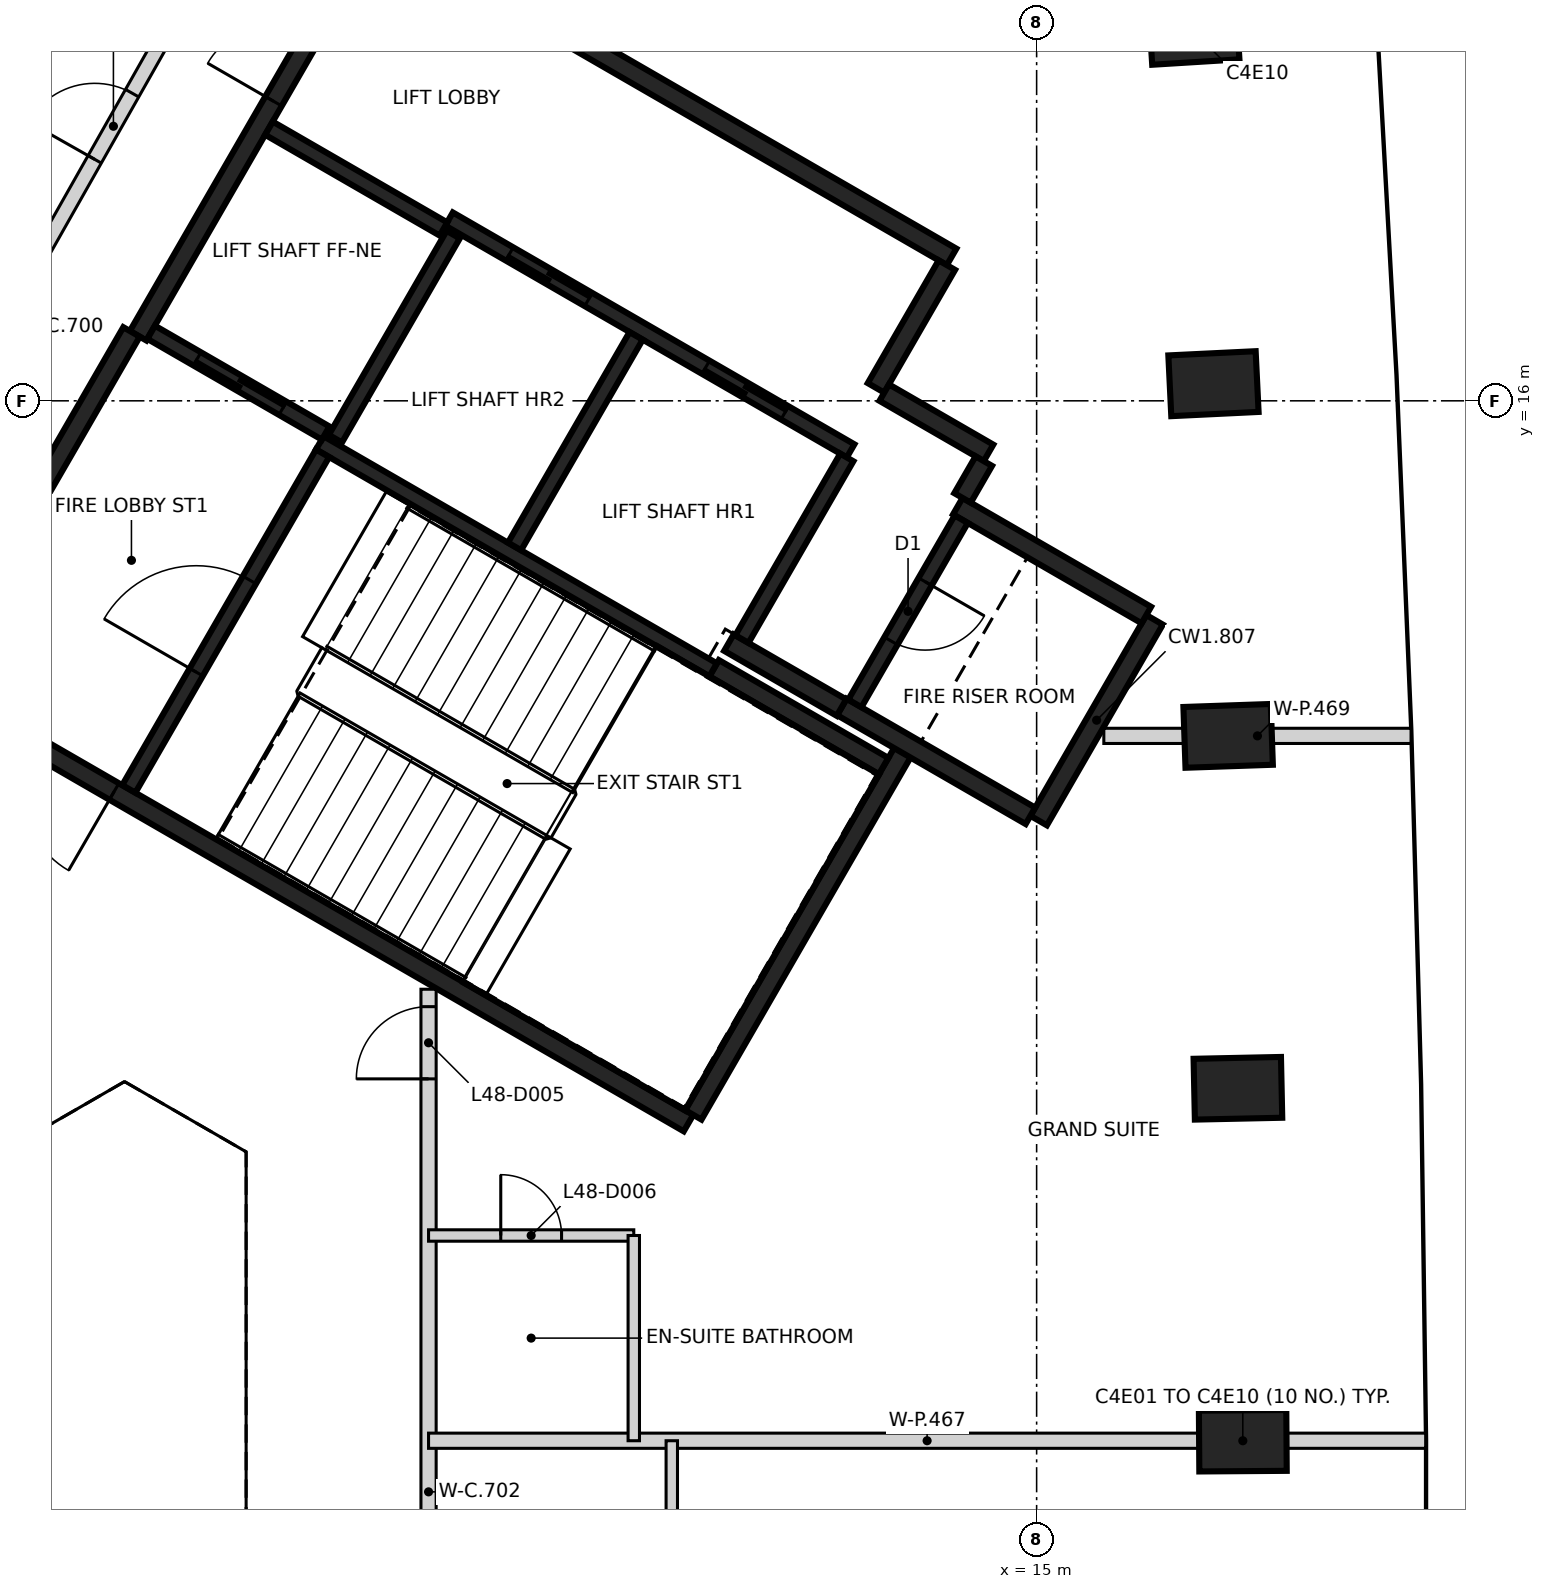
"""IFC4 building model, lengths in metres.
Left out: names, types, materials, properties, quantities, classifications, styles, units other than length and angle.
Written with IfcOpenShell. Run it as: python <this file> out.ifc"""

import sys

from ifc_helpers import new_model, si_unit, direction, frame, frame_2d, origin, origin_2d, place, context, subcontext, project, spatial, rectangle, extrude, element, fill, save


model = new_model("IFC4")
c1 = context("Model", 3, precision=1e-05, world=origin(), true_north=direction((0.0, 1.0)))
c2 = subcontext(c1, "Body", "Model", "MODEL_VIEW")
j1 = project(units=[si_unit("LENGTHUNIT", "METRE"), si_unit("PLANEANGLEUNIT", "RADIAN")], contexts=[c1])
p1 = place(None, origin())
s1 = spatial("IfcSite", under=j1, at=p1, CompositionType="ELEMENT")
p2 = place(p1, origin())
s2 = spatial("IfcBuilding", under=s1, at=p2, CompositionType="ELEMENT")
p3 = place(p2, frame((0.0, 0.0, 193.6)))
s3 = spatial("IfcBuildingStorey", under=s2, at=p3, CompositionType="ELEMENT", Elevation=193.6)
for number, where, z_axis, x_axis in (
    (1, (17.712, 2.319, -0.35), (0.0, 0.0, 1.0), (1.0, 0.007, 0.0)),
    (2, (17.648, 6.956, -0.35), (0.0, 0.0, 1.0), (1.0, 0.021, 0.0)),
    (3, (17.519, 11.592, -0.35), (0.0, 0.0, 1.0), (0.999, 0.034, 0.0)),
    (4, (17.326, 16.226, -0.35), (0.0, 0.0, 1.0), (0.999, 0.048, 0.0)),
    (5, (17.07, 20.856, -0.35), (0.0, 0.0, 1.0), (0.998, 0.062, 0.0)),
):
    element("IfcColumn", number, at=place(p3, frame(where, z_axis=z_axis, x_axis=x_axis)), inside=s3, PredefinedType="COLUMN", context=c2, shape_type="SweptSolid", body=[
        extrude(rectangle(XDim=1.15, YDim=0.8, at=origin_2d()), origin(), (0.0, 0.0, 1.0), 3.6),
    ])
p4 = place(p3, frame((10.42, 6.498, 0.0), z_axis=(0.0, 0.0, 1.0), x_axis=(-0.866021906294, 0.500006057782, 0.0)))
e6 = element("IfcWall", 6, at=p4, inside=s3, PredefinedType="SHEAR", context=c2, shape_type="SweptSolid", body=[
    extrude(rectangle(XDim=11.55, YDim=0.25, at=frame_2d((5.775, 0.0))), origin(), (0.0, 0.0, 1.0), 3.25),
])
p5 = place(p4, frame((10.025, 0.0, 0.0)))
e7 = element("IfcOpeningElement", 7, at=p5, cuts=e6, PredefinedType="OPENING", context=c2, shape_type="SweptSolid", body=[
    extrude(rectangle(XDim=1.2, YDim=2.1, at=frame_2d((0.6, 1.05))), frame((0.0, 0.135, 0.0), z_axis=(0.0, -1.0, 0.0), x_axis=(1.0, 0.0, 0.0)), (0.0, 0.0, 1.0), 0.27),
])
p6 = place(p4, frame((8.725, 0.0, 0.0)))
e8 = element("IfcOpeningElement", 8, at=p6, cuts=e6, PredefinedType="OPENING", context=c2, shape_type="SweptSolid", body=[
    extrude(rectangle(XDim=1.2, YDim=2.1, at=frame_2d((0.6, 1.05))), frame((0.0, 0.135, 0.0), z_axis=(0.0, -1.0, 0.0), x_axis=(1.0, 0.0, 0.0)), (0.0, 0.0, 1.0), 0.27),
])
p7 = place(p3, frame((6.304, 22.269, 0.0), z_axis=(0.0, 0.0, 1.0), x_axis=(0.866022959057, -0.500004234368, 0.0)))
e9 = element("IfcWall", 9, at=p7, inside=s3, PredefinedType="SHEAR", context=c2, shape_type="SweptSolid", body=[
    extrude(rectangle(XDim=8.75, YDim=0.25, at=frame_2d((4.375, 0.0))), origin(), (0.0, 0.0, 1.0), 3.25),
])
p8 = place(p3, frame((3.179, 16.856, 0.0), z_axis=(0.0, 0.0, 1.0), x_axis=(0.500001955336, 0.866024274868, 0.0)))
e10 = element("IfcWall", 10, at=p8, inside=s3, PredefinedType="SHEAR", context=c2, shape_type="SweptSolid", body=[
    extrude(rectangle(XDim=6.125, YDim=0.25, at=frame_2d((3.062, 0.0))), origin(), (0.0, 0.0, 1.0), 3.25),
])
p9 = place(p8, frame((3.563, 0.0, 0.0)))
e11 = element("IfcOpeningElement", 11, at=p9, cuts=e10, PredefinedType="OPENING", context=c2, shape_type="SweptSolid", body=[
    extrude(rectangle(XDim=1.0, YDim=2.1, at=frame_2d((0.5, 1.05))), frame((0.0, 0.135, 0.0), z_axis=(0.0, -1.0, 0.0), x_axis=(1.0, 0.0, 0.0)), (0.0, 0.0, 1.0), 0.27),
])
p10 = place(p3, frame((0.48, 12.381, 0.0), z_axis=(0.0, 0.0, 1.0), x_axis=(0.49999885962, 0.866026062182, 0.0)))
e12 = element("IfcWall", 12, at=p10, inside=s3, PredefinedType="SHEAR", context=c2, shape_type="SweptSolid", body=[
    extrude(rectangle(XDim=5.225, YDim=0.25, at=frame_2d((2.612, 0.0))), origin(), (0.0, 0.0, 1.0), 3.25),
])
p11 = place(p3, frame((13.238, 11.378, 0.0), z_axis=(0.0, 0.0, 1.0), x_axis=(-0.500008851346, -0.866020293397, 0.0)))
e13 = element("IfcWall", 13, at=p11, inside=s3, PredefinedType="SHEAR", context=c2, shape_type="SweptSolid", body=[
    extrude(rectangle(XDim=5.51, YDim=0.25, at=frame_2d((2.755, 0.0))), origin(), (0.0, 0.0, 1.0), 3.25),
])
p12 = place(p3, frame((16.552, 13.119, 0.0), z_axis=(0.0, 0.0, 1.0), x_axis=(-0.499978833458, -0.866037623948, 0.0)))
e14 = element("IfcWall", 14, at=p12, inside=s3, PredefinedType="SHEAR", context=c2, shape_type="SweptSolid", body=[
    extrude(rectangle(XDim=3.05, YDim=0.25, at=frame_2d((1.525, 0.0))), origin(), (0.0, 0.0, 1.0), 3.25),
])
p13 = place(p3, frame((14.918, 10.54, 0.0), z_axis=(0.0, 0.0, 1.0), x_axis=(-0.866063538972, 0.499933942099, 0.0)))
e15 = element("IfcWall", 15, at=p13, inside=s3, PredefinedType="SHEAR", context=c2, shape_type="SweptSolid", body=[
    extrude(rectangle(XDim=2.865, YDim=0.25, at=frame_2d((1.432, 0.0))), origin(), (0.0, 0.0, 1.0), 3.25),
])
p14 = place(p3, frame((13.963, 14.614, 0.0), z_axis=(0.0, 0.0, 1.0), x_axis=(0.866042235819, -0.499970844928, 0.0)))
e16 = element("IfcWall", 16, at=p14, inside=s3, PredefinedType="SHEAR", context=c2, shape_type="SweptSolid", body=[
    extrude(rectangle(XDim=2.865, YDim=0.25, at=frame_2d((1.432, 0.0))), origin(), (0.0, 0.0, 1.0), 3.25),
])
p15 = place(p3, frame((10.757, 12.481, 0.0), z_axis=(0.0, 0.0, 1.0), x_axis=(0.866022940537, -0.500004266446, 0.0)))
e17 = element("IfcWall", 17, at=p15, inside=s3, PredefinedType="SHEAR", context=c2, shape_type="SweptSolid", body=[
    extrude(rectangle(XDim=2.575, YDim=0.25, at=frame_2d((1.287, 0.0))), origin(), (0.0, 0.0, 1.0), 3.25),
])
p16 = place(p3, frame((13.819, 17.785, 0.0), z_axis=(0.0, 0.0, 1.0), x_axis=(-0.500039802285, -0.866002422705, 0.0)))
e18 = element("IfcWall", 18, at=p16, inside=s3, PredefinedType="SHEAR", context=c2, shape_type="SweptSolid", body=[
    extrude(rectangle(XDim=1.865, YDim=0.25, at=frame_2d((0.932, 0.0))), origin(), (0.0, 0.0, 1.0), 3.25),
])
p17 = place(p3, frame((12.433, 11.964, 0.0), z_axis=(0.0, 0.0, 1.0), x_axis=(-0.866038183914, 0.499977863513, 0.0)))
e19 = element("IfcWall", 19, at=p17, inside=s3, PredefinedType="SHEAR", context=c2, shape_type="SweptSolid", body=[
    extrude(rectangle(XDim=1.71, YDim=0.25, at=frame_2d((0.855, 0.0))), origin(), (0.0, 0.0, 1.0), 3.25),
])
p18 = place(p3, frame((12.995, 16.108, 0.0), z_axis=(0.0, 0.0, 1.0), x_axis=(0.866044474677, -0.49996696679, 0.0)))
e20 = element("IfcWall", 20, at=p18, inside=s3, PredefinedType="SHEAR", context=c2, shape_type="SweptSolid", body=[
    extrude(rectangle(XDim=1.584, YDim=0.25, at=frame_2d((0.792, 0.0))), origin(), (0.0, 0.0, 1.0), 3.25),
])
p19 = place(p3, frame((14.305, 15.207, 0.0), z_axis=(0.0, 0.0, 1.0), x_axis=(-0.499848422343, -0.866112899501, 0.0)))
e21 = element("IfcWall", 21, at=p19, inside=s3, PredefinedType="SHEAR", context=c2, shape_type="SweptSolid", body=[
    extrude(rectangle(XDim=0.559, YDim=0.25, at=frame_2d((0.28, 0.0))), origin(), (0.0, 0.0, 1.0), 3.25),
])
p20 = place(p3, frame((12.552, 15.342, 0.0), z_axis=(0.0, 0.0, 1.0), x_axis=(-0.866030299012, 0.499991521122, 0.0)))
e22 = element("IfcWall", 22, at=p20, inside=s3, PredefinedType="SHEAR", context=c2, shape_type="SweptSolid", body=[
    extrude(rectangle(XDim=6.1, YDim=0.2, at=frame_2d((3.05, 0.0))), origin(), (0.0, 0.0, 1.0), 3.25),
])
p21 = place(p20, frame((1.0, 0.0, 0.0)))
e23 = element("IfcOpeningElement", 23, at=p21, cuts=e22, PredefinedType="OPENING", context=c2, shape_type="SweptSolid", body=[
    extrude(rectangle(XDim=1.2, YDim=2.1, at=frame_2d((0.6, 1.05))), frame((0.0, 0.11, 0.0), z_axis=(0.0, -1.0, 0.0), x_axis=(1.0, 0.0, 0.0)), (0.0, 0.0, 1.0), 0.22),
])
p22 = place(p20, frame((3.982, 0.0, 0.0)))
e24 = element("IfcOpeningElement", 24, at=p22, cuts=e22, PredefinedType="OPENING", context=c2, shape_type="SweptSolid", body=[
    extrude(rectangle(XDim=1.2, YDim=2.1, at=frame_2d((0.6, 1.05))), frame((0.0, 0.11, 0.0), z_axis=(0.0, -1.0, 0.0), x_axis=(1.0, 0.0, 0.0)), (0.0, 0.0, 1.0), 0.22),
])
p23 = place(p3, frame((10.743, 12.46, 0.0), z_axis=(0.0, 0.0, 1.0), x_axis=(-0.866018848283, 0.500011354289, 0.0)))
e25 = element("IfcWall", 25, at=p23, inside=s3, PredefinedType="SHEAR", context=c2, shape_type="SweptSolid", body=[
    extrude(rectangle(XDim=5.974, YDim=0.2, at=frame_2d((2.987, 0.0))), origin(), (0.0, 0.0, 1.0), 3.25),
])
p24 = place(p3, frame((3.057, 10.895, 0.0), z_axis=(0.0, 0.0, 1.0), x_axis=(0.500027839223, 0.866009330205, 0.0)))
e26 = element("IfcWall", 26, at=p24, inside=s3, PredefinedType="SHEAR", context=c2, shape_type="SweptSolid", body=[
    extrude(rectangle(XDim=5.098, YDim=0.2, at=frame_2d((2.549, 0.0))), origin(), (0.0, 0.0, 1.0), 3.25),
])
p25 = place(p24, frame((1.774, 0.0, 0.0)))
e27 = element("IfcOpeningElement", 27, at=p25, cuts=e26, PredefinedType="OPENING", context=c2, shape_type="SweptSolid", body=[
    extrude(rectangle(XDim=1.4, YDim=2.1, at=frame_2d((0.7, 1.05))), frame((0.0, 0.11, 0.0), z_axis=(0.0, -1.0, 0.0), x_axis=(1.0, 0.0, 0.0)), (0.0, 0.0, 1.0), 0.22),
])
p26 = place(p3, frame((8.132, 14.084, 0.0), z_axis=(0.0, 0.0, 1.0), x_axis=(0.500030834389, 0.86600760081, 0.0)))
e28 = element("IfcWall", 28, at=p26, inside=s3, PredefinedType="SHEAR", context=c2, shape_type="SweptSolid", body=[
    extrude(rectangle(XDim=3.198, YDim=0.2, at=frame_2d((1.599, 0.0))), origin(), (0.0, 0.0, 1.0), 3.25),
])
p27 = place(p3, frame((14.008, 14.442, 0.0), z_axis=(0.0, 0.0, 1.0), x_axis=(-0.499986818241, -0.866033014143, 0.0)))
e29 = element("IfcWall", 29, at=p27, inside=s3, PredefinedType="SHEAR", context=c2, shape_type="SweptSolid", body=[
    extrude(rectangle(XDim=2.798, YDim=0.2, at=frame_2d((1.399, 0.0))), origin(), (0.0, 0.0, 1.0), 3.25),
])
p28 = place(p27, frame((0.949, 0.0, 0.0)))
e30 = element("IfcOpeningElement", 30, at=p28, cuts=e29, PredefinedType="OPENING", context=c2, shape_type="SweptSolid", body=[
    extrude(rectangle(XDim=0.9, YDim=2.1, at=frame_2d((0.45, 1.05))), frame((0.0, 0.11, 0.0), z_axis=(0.0, -1.0, 0.0), x_axis=(1.0, 0.0, 0.0)), (0.0, 0.0, 1.0), 0.22),
])
p29 = place(p3, frame((12.502, 15.255, 0.0), z_axis=(0.0, 0.0, 1.0), x_axis=(-0.499965018551, -0.866045599391, 0.0)))
e31 = element("IfcWall", 31, at=p29, inside=s3, PredefinedType="SHEAR", context=c2, shape_type="SweptSolid", body=[
    extrude(rectangle(XDim=2.759, YDim=0.2, at=frame_2d((1.379, 0.0))), origin(), (0.0, 0.0, 1.0), 3.25),
])
p30 = place(p3, frame((7.324, 18.187, 0.0), z_axis=(0.0, 0.0, 1.0), x_axis=(-0.499967891604, -0.866043940782, 0.0)))
e32 = element("IfcWall", 32, at=p30, inside=s3, PredefinedType="SHEAR", context=c2, shape_type="SweptSolid", body=[
    extrude(rectangle(XDim=3.1, YDim=0.2, at=frame_2d((1.55, 0.0))), origin(), (0.0, 0.0, 1.0), 3.25),
])
p31 = place(p3, frame((5.646, 15.576, 0.0), z_axis=(0.0, 0.0, 1.0), x_axis=(-0.866018407898, 0.500012117035, 0.0)))
e33 = element("IfcWall", 33, at=p31, inside=s3, PredefinedType="SHEAR", context=c2, shape_type="SweptSolid", body=[
    extrude(rectangle(XDim=2.651, YDim=0.2, at=frame_2d((1.325, 0.0))), origin(), (0.0, 0.0, 1.0), 3.25),
])
p32 = place(p31, frame((0.652, 0.0, 0.0)))
e34 = element("IfcOpeningElement", 34, at=p32, cuts=e33, PredefinedType="OPENING", context=c2, shape_type="SweptSolid", body=[
    extrude(rectangle(XDim=1.3, YDim=2.1, at=frame_2d((0.65, 1.05))), frame((0.0, 0.11, 0.0), z_axis=(0.0, -1.0, 0.0), x_axis=(1.0, 0.0, 0.0)), (0.0, 0.0, 1.0), 0.22),
])
p33 = place(p3, frame((7.196, 18.26, 0.0), z_axis=(0.0, 0.0, 1.0), x_axis=(-0.866018407898, 0.500012117035, 0.0)))
e35 = element("IfcWall", 35, at=p33, inside=s3, PredefinedType="SHEAR", context=c2, shape_type="SweptSolid", body=[
    extrude(rectangle(XDim=2.651, YDim=0.2, at=frame_2d((1.325, 0.0))), origin(), (0.0, 0.0, 1.0), 3.25),
])
p34 = place(p3, frame((-1.085, 12.65, 0.0), z_axis=(0.0, 0.0, 1.0), x_axis=(0.49243456751, 0.870349468157, 0.0)))
e36 = element("IfcWall", 36, at=p34, inside=s3, PredefinedType="PARTITIONING", context=c2, shape_type="SweptSolid", body=[
    extrude(rectangle(XDim=10.531, YDim=0.2, at=frame_2d((5.266, 0.0))), origin(), (0.0, 0.0, 1.0), 3.25),
])
p35 = place(p34, frame((7.499, 0.0, 0.0)))
e37 = element("IfcOpeningElement", 37, at=p35, cuts=e36, PredefinedType="OPENING", context=c2, shape_type="SweptSolid", body=[
    extrude(rectangle(XDim=1.0, YDim=2.1, at=frame_2d((0.5, 1.05))), frame((0.0, 0.11, 0.0), z_axis=(0.0, -1.0, 0.0), x_axis=(1.0, 0.0, 0.0)), (0.0, 0.0, 1.0), 0.22),
])
p36 = place(p3, frame((7.0, -4.966, 0.0), z_axis=(0.0, 0.0, 1.0), x_axis=(0.0, 1.0, 0.0)))
e38 = element("IfcWall", 38, at=p36, inside=s3, PredefinedType="PARTITIONING", context=c2, shape_type="SweptSolid", body=[
    extrude(rectangle(XDim=13.225, YDim=0.2, at=frame_2d((6.612, 0.0))), origin(), (0.0, 0.0, 1.0), 3.25),
])
p37 = place(p36, frame((2.835, 0.0, 0.0)))
e39 = element("IfcOpeningElement", 39, at=p37, cuts=e38, PredefinedType="OPENING", context=c2, shape_type="SweptSolid", body=[
    extrude(rectangle(XDim=1.0, YDim=2.1, at=frame_2d((0.5, 1.05))), frame((0.0, 0.11, 0.0), z_axis=(0.0, -1.0, 0.0), x_axis=(1.0, 0.0, 0.0)), (0.0, 0.0, 1.0), 0.22),
])
p38 = place(p36, frame((12.045, 0.0, 0.0)))
e40 = element("IfcOpeningElement", 40, at=p38, cuts=e38, PredefinedType="OPENING", context=c2, shape_type="SweptSolid", body=[
    extrude(rectangle(XDim=0.95, YDim=2.1, at=frame_2d((0.475, 1.05))), frame((0.0, 0.11, 0.0), z_axis=(0.0, -1.0, 0.0), x_axis=(1.0, 0.0, 0.0)), (0.0, 0.0, 1.0), 0.22),
])
p39 = place(p3, frame((7.0, 2.319, 0.0), z_axis=(0.0, 0.0, 1.0), x_axis=(1.0, 0.0, 0.0)))
e41 = element("IfcWall", 41, at=p39, inside=s3, PredefinedType="PARTITIONING", context=c2, shape_type="SweptSolid", body=[
    extrude(rectangle(XDim=13.118, YDim=0.2, at=frame_2d((6.559, 0.0))), origin(), (0.0, 0.0, 1.0), 3.25),
])
p40 = place(p3, frame((15.884, 11.592, 0.0), z_axis=(0.0, 0.0, 1.0), x_axis=(1.0, 0.0, 0.0)))
e42 = element("IfcWall", 42, at=p40, inside=s3, PredefinedType="PARTITIONING", context=c2, shape_type="SweptSolid", body=[
    extrude(rectangle(XDim=4.042, YDim=0.2, at=frame_2d((2.021, 0.0))), origin(), (0.0, 0.0, 1.0), 3.25),
])
p41 = place(p3, frame((7.0, 5.019, 0.0), z_axis=(0.0, 0.0, 1.0), x_axis=(1.0, 0.0, 0.0)))
e43 = element("IfcWall", 43, at=p41, inside=s3, PredefinedType="PARTITIONING", context=c2, shape_type="SweptSolid", body=[
    extrude(rectangle(XDim=2.7, YDim=0.15, at=frame_2d((1.35, 0.0))), origin(), (0.0, 0.0, 1.0), 3.25),
])
p42 = place(p41, frame((0.95, 0.0, 0.0)))
e44 = element("IfcOpeningElement", 44, at=p42, cuts=e43, PredefinedType="OPENING", context=c2, shape_type="SweptSolid", body=[
    extrude(rectangle(XDim=0.8, YDim=2.1, at=frame_2d((0.4, 1.05))), frame((0.0, 0.085, 0.0), z_axis=(0.0, -1.0, 0.0), x_axis=(1.0, 0.0, 0.0)), (0.0, 0.0, 1.0), 0.17),
])
p43 = place(p3, frame((9.7, 2.319, 0.0), z_axis=(0.0, 0.0, 1.0), x_axis=(0.0, 1.0, 0.0)))
e45 = element("IfcWall", 45, at=p43, inside=s3, PredefinedType="PARTITIONING", context=c2, shape_type="SweptSolid", body=[
    extrude(rectangle(XDim=2.7, YDim=0.15, at=frame_2d((1.35, 0.0))), origin(), (0.0, 0.0, 1.0), 3.25),
])
p44 = place(p3, frame((10.2, -0.719, 0.0), z_axis=(0.0, 0.0, 1.0), x_axis=(0.0, 1.0, 0.0)))
e46 = element("IfcWall", 46, at=p44, inside=s3, PredefinedType="PARTITIONING", context=c2, shape_type="SweptSolid", body=[
    extrude(rectangle(XDim=3.038, YDim=0.15, at=frame_2d((1.519, 0.0))), origin(), (0.0, 0.0, 1.0), 3.25),
])
p45 = place(p32, origin())
e47 = element("IfcDoor", 47, at=p45, inside=s3, OperationType="SLIDING_TO_LEFT", PredefinedType="DOOR", context=c2, shape_type="SweptSolid", body=[
    extrude(rectangle(XDim=1.3, YDim=2.1, at=frame_2d((0.65, 1.05))), frame((0.0, 0.025, 0.0), z_axis=(0.0, -1.0, 0.0), x_axis=(1.0, 0.0, 0.0)), (0.0, 0.0, 1.0), 0.05),
])
fill(e34, e47)
p46 = place(p21, origin())
e48 = element("IfcDoor", 48, at=p46, inside=s3, OperationType="DOUBLE_DOOR_SLIDING", PredefinedType="DOOR", context=c2, shape_type="SweptSolid", body=[
    extrude(rectangle(XDim=1.2, YDim=2.1, at=frame_2d((0.6, 1.05))), frame((0.0, 0.025, 0.0), z_axis=(0.0, -1.0, 0.0), x_axis=(1.0, 0.0, 0.0)), (0.0, 0.0, 1.0), 0.05),
])
fill(e23, e48)
p47 = place(p22, origin())
e49 = element("IfcDoor", 49, at=p47, inside=s3, OperationType="DOUBLE_DOOR_SLIDING", PredefinedType="DOOR", context=c2, shape_type="SweptSolid", body=[
    extrude(rectangle(XDim=1.2, YDim=2.1, at=frame_2d((0.6, 1.05))), frame((0.0, 0.025, 0.0), z_axis=(0.0, -1.0, 0.0), x_axis=(1.0, 0.0, 0.0)), (0.0, 0.0, 1.0), 0.05),
])
fill(e24, e49)
p48 = place(p9, origin())
e50 = element("IfcDoor", 50, at=p48, inside=s3, OperationType="SINGLE_SWING_LEFT", PredefinedType="DOOR", context=c2, shape_type="SweptSolid", body=[
    extrude(rectangle(XDim=1.0, YDim=2.1, at=frame_2d((0.5, 1.05))), frame((0.0, 0.025, 0.0), z_axis=(0.0, -1.0, 0.0), x_axis=(1.0, 0.0, 0.0)), (0.0, 0.0, 1.0), 0.05),
])
fill(e11, e50)
p49 = place(p6, origin())
e51 = element("IfcDoor", 51, at=p49, inside=s3, OperationType="SINGLE_SWING_RIGHT", PredefinedType="DOOR", context=c2, shape_type="SweptSolid", body=[
    extrude(rectangle(XDim=1.2, YDim=2.1, at=frame_2d((0.6, 1.05))), frame((0.0, 0.025, 0.0), z_axis=(0.0, -1.0, 0.0), x_axis=(1.0, 0.0, 0.0)), (0.0, 0.0, 1.0), 0.05),
])
fill(e8, e51)
p50 = place(p25, origin())
e52 = element("IfcDoor", 52, at=p50, inside=s3, OperationType="SINGLE_SWING_LEFT", PredefinedType="DOOR", context=c2, shape_type="SweptSolid", body=[
    extrude(rectangle(XDim=1.4, YDim=2.1, at=frame_2d((0.7, 1.05))), frame((0.0, 0.025, 0.0), z_axis=(0.0, -1.0, 0.0), x_axis=(1.0, 0.0, 0.0)), (0.0, 0.0, 1.0), 0.05),
])
fill(e27, e52)
p51 = place(p28, origin())
e53 = element("IfcDoor", 53, at=p51, inside=s3, OperationType="SINGLE_SWING_RIGHT", PredefinedType="DOOR", context=c2, shape_type="SweptSolid", body=[
    extrude(rectangle(XDim=0.9, YDim=2.1, at=frame_2d((0.45, 1.05))), frame((0.0, 0.025, 0.0), z_axis=(0.0, -1.0, 0.0), x_axis=(1.0, 0.0, 0.0)), (0.0, 0.0, 1.0), 0.05),
])
fill(e30, e53)
p52 = place(p38, frame((0.95, 0.0, 0.0), z_axis=(0.0, 0.0, 1.0), x_axis=(-1.0, 0.0, 0.0)))
e54 = element("IfcDoor", 54, at=p52, inside=s3, OperationType="SINGLE_SWING_LEFT", PredefinedType="DOOR", context=c2, shape_type="SweptSolid", body=[
    extrude(rectangle(XDim=0.95, YDim=2.1, at=frame_2d((0.475, 1.05))), frame((0.0, 0.025, 0.0), z_axis=(0.0, -1.0, 0.0), x_axis=(1.0, 0.0, 0.0)), (0.0, 0.0, 1.0), 0.05),
])
fill(e40, e54)
p53 = place(p42, origin())
e55 = element("IfcDoor", 55, at=p53, inside=s3, OperationType="SINGLE_SWING_LEFT", PredefinedType="DOOR", context=c2, shape_type="SweptSolid", body=[
    extrude(rectangle(XDim=0.8, YDim=2.1, at=frame_2d((0.4, 1.05))), frame((0.0, 0.025, 0.0), z_axis=(0.0, -1.0, 0.0), x_axis=(1.0, 0.0, 0.0)), (0.0, 0.0, 1.0), 0.05),
])
fill(e44, e55)
p54 = place(p35, frame((1.0, 0.0, 0.0), z_axis=(0.0, 0.0, 1.0), x_axis=(-1.0, 0.0, 0.0)))
e56 = element("IfcDoor", 56, at=p54, inside=s3, OperationType="SINGLE_SWING_LEFT", PredefinedType="DOOR", context=c2, shape_type="SweptSolid", body=[
    extrude(rectangle(XDim=1.0, YDim=2.1, at=frame_2d((0.5, 1.05))), frame((0.0, 0.025, 0.0), z_axis=(0.0, -1.0, 0.0), x_axis=(1.0, 0.0, 0.0)), (0.0, 0.0, 1.0), 0.05),
])
fill(e37, e56)
save(model, sys.argv[1])
